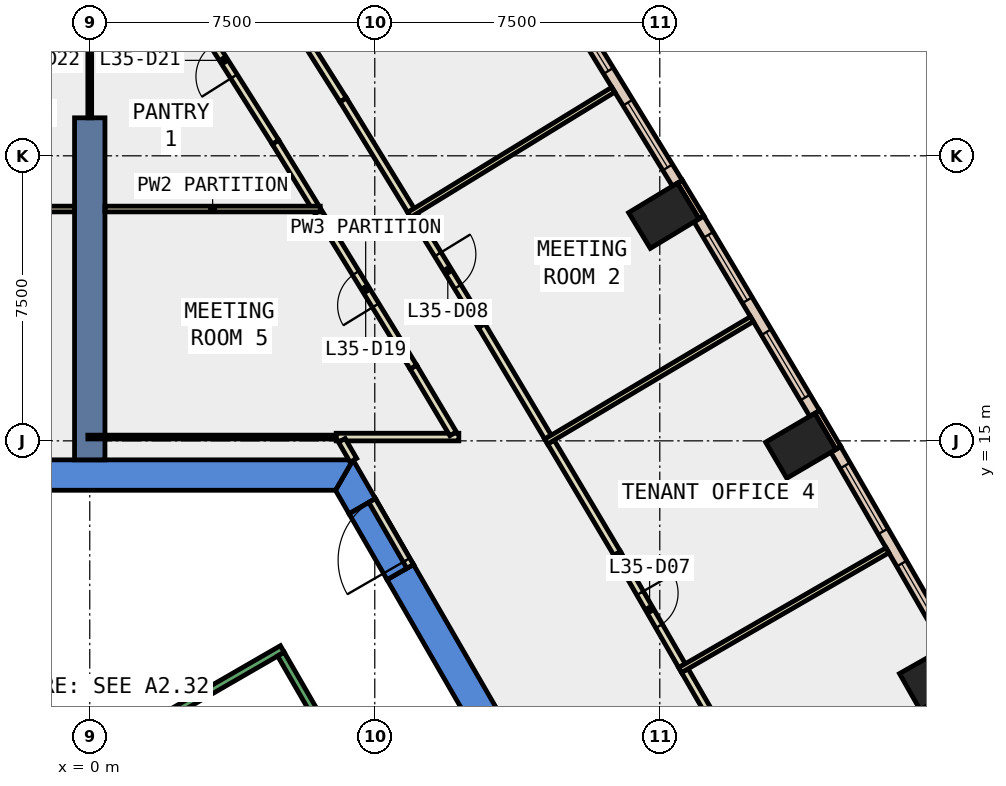
"""IFC4 building model, lengths in metres.
Left out: names, types, materials, properties, quantities, classifications, styles, units other than length and angle.
Written with IfcOpenShell. Run it as: python <this file> out.ifc"""

import sys

from ifc_helpers import new_model, si_unit, direction, frame, frame_2d, origin, origin_2d, place, context, subcontext, project, spatial, polyline, rectangle, outline, extrude, element, fill, save


model = new_model("IFC4")
c1 = context("Model", 3, precision=1e-05, world=origin(), true_north=direction((0.0, 1.0)))
c2 = subcontext(c1, "Body", "Model", "MODEL_VIEW")
j1 = project(units=[si_unit("LENGTHUNIT", "METRE"), si_unit("PLANEANGLEUNIT", "RADIAN")], contexts=[c1])
p1 = place(None, origin())
s1 = spatial("IfcSite", under=j1, at=p1, CompositionType="ELEMENT")
p2 = place(p1, origin())
s2 = spatial("IfcBuilding", under=s1, at=p2, CompositionType="ELEMENT")
p3 = place(p2, frame((0.0, 0.0, 159.2)))
s3 = spatial("IfcBuildingStorey", under=s2, at=p3, CompositionType="ELEMENT", Elevation=159.2)
for number, where, z_axis, x_axis in (
    (1, (22.232, 8.769, -0.4), (0.0, 0.0, 1.0), (-0.494, 0.869, 0.0)),
    (2, (18.71, 14.87, -0.4), (0.0, 0.0, 1.0), (-0.506, 0.863, 0.0)),
    (3, (15.107, 20.923, -0.4), (0.0, 0.0, 1.0), (-0.518, 0.855, 0.0)),
):
    element("IfcColumn", number, at=place(p3, frame(where, z_axis=z_axis, x_axis=x_axis)), inside=s3, PredefinedType="COLUMN", context=c2, shape_type="SweptSolid", body=[
        extrude(rectangle(XDim=1.1, YDim=1.5, at=origin_2d()), origin(), (0.0, 0.0, 1.0), 4.2),
    ])
p4 = place(p3, frame((0.0, 0.0, -0.4)))
e4 = element("IfcWall", 4, at=p4, inside=s3, PredefinedType="SHEAR", context=c2, shape_type="SweptSolid", body=[
    extrude(outline(polyline([(8.517, 11.748), (7.824, 11.348), (12.933, 2.5), (13.856, 2.5), (8.517, 11.748)])), origin(), (0.0, 0.0, 1.0), 4.2),
])
p5 = place(p3, frame((0.0, 0.0, -0.4)))
e5 = element("IfcWall", 5, at=p5, inside=s3, PredefinedType="SHEAR", context=c2, shape_type="SweptSolid", body=[
    extrude(outline(polyline([(6.824, 13.08), (7.517, 13.48), (6.928, 14.5), (6.466, 13.7), (6.824, 13.08)])), origin(), (0.0, 0.0, 1.0), 4.2),
])
p6 = place(p3, frame((0.0, 0.0, 3.6)))
e6 = element("IfcWall", 6, at=p6, inside=s3, PredefinedType="SHEAR", context=c2, shape_type="SweptSolid", body=[
    extrude(outline(polyline([(7.517, 13.48), (6.824, 13.08), (7.824, 11.348), (8.517, 11.748), (7.517, 13.48)])), origin(), (0.0, 0.0, 1.0), 0.2),
])
p7 = place(p3, frame((0.0, 0.0, -0.4)))
e7 = element("IfcWall", 7, at=p7, inside=s3, PredefinedType="SHEAR", context=c2, shape_type="SweptSolid", body=[
    extrude(outline(polyline([(6.928, 14.5), (-6.928, 14.5), (-6.466, 13.7), (6.466, 13.7), (6.928, 14.5)])), origin(), (0.0, 0.0, 1.0), 4.2),
])
p8 = place(p3, frame((0.0, 14.5, -0.4), z_axis=(0.0, 0.0, 1.0), x_axis=(0.0, 1.0, 0.0)))
e8 = element("IfcWall", 8, at=p8, inside=s3, PredefinedType="SHEAR", context=c2, shape_type="SweptSolid", body=[
    extrude(rectangle(XDim=9.0, YDim=0.8, at=frame_2d((4.5, 0.0))), origin(), (0.0, 0.0, 1.0), 4.2),
])
p9 = place(p3, frame((19.7, 14.813, 0.0), z_axis=(0.0, 0.0, 1.0), x_axis=(-0.506505715302, 0.862236603472, 0.0)))
e9 = element("IfcWall", 9, at=p9, inside=s3, PredefinedType="STANDARD", context=c2, shape_type="SweptSolid", body=[
    extrude(rectangle(XDim=1.099, YDim=0.15, at=frame_2d((0.55, 0.0))), origin(), (0.0, 0.0, 1.0), 3.8),
])
p10 = place(p3, frame((16.098, 20.88, 0.0), z_axis=(0.0, 0.0, 1.0), x_axis=(-0.517918067967, 0.85543022794, 0.0)))
e10 = element("IfcWall", 10, at=p10, inside=s3, PredefinedType="STANDARD", context=c2, shape_type="SweptSolid", body=[
    extrude(rectangle(XDim=1.1, YDim=0.15, at=frame_2d((0.55, 0.0))), origin(), (0.0, 0.0, 1.0), 3.8),
])
p11 = place(p3, frame((22.61, 9.615, 0.0), z_axis=(0.0, 0.0, 1.0), x_axis=(-0.500061823953, 0.865989706766, 0.0)))
e11 = element("IfcWall", 11, at=p11, inside=s3, PredefinedType="STANDARD", context=c2, shape_type="SweptSolid", body=[
    extrude(rectangle(XDim=5.957, YDim=0.3, at=frame_2d((2.979, 0.0))), origin(), (0.0, 0.0, 1.0), 3.8),
])
p12 = place(p11, frame((0.489, 0.0, 0.9)))
e12 = element("IfcOpeningElement", 12, at=p12, cuts=e11, PredefinedType="OPENING", context=c2, shape_type="SweptSolid", body=[
    extrude(rectangle(XDim=2.0, YDim=2.6, at=frame_2d((1.0, 1.3))), frame((0.0, 0.16, 0.0), z_axis=(0.0, -1.0, 0.0), x_axis=(1.0, 0.0, 0.0)), (0.0, 0.0, 1.0), 0.32),
])
p13 = place(p11, frame((3.468, 0.0, 0.9)))
e13 = element("IfcOpeningElement", 13, at=p13, cuts=e11, PredefinedType="OPENING", context=c2, shape_type="SweptSolid", body=[
    extrude(rectangle(XDim=2.0, YDim=2.6, at=frame_2d((1.0, 1.3))), frame((0.0, 0.16, 0.0), z_axis=(0.0, -1.0, 0.0), x_axis=(1.0, 0.0, 0.0)), (0.0, 0.0, 1.0), 0.32),
])
p14 = place(p3, frame((19.076, 15.721, 0.0), z_axis=(0.0, 0.0, 1.0), x_axis=(-0.511455040009, 0.859310038374, 0.0)))
e14 = element("IfcWall", 14, at=p14, inside=s3, PredefinedType="STANDARD", context=c2, shape_type="SweptSolid", body=[
    extrude(rectangle(XDim=5.957, YDim=0.3, at=frame_2d((2.979, 0.0))), origin(), (0.0, 0.0, 1.0), 3.8),
])
p15 = place(p14, frame((0.489, 0.0, 0.9)))
e15 = element("IfcOpeningElement", 15, at=p15, cuts=e14, PredefinedType="OPENING", context=c2, shape_type="SweptSolid", body=[
    extrude(rectangle(XDim=2.0, YDim=2.6, at=frame_2d((1.0, 1.3))), frame((0.0, 0.16, 0.0), z_axis=(0.0, -1.0, 0.0), x_axis=(1.0, 0.0, 0.0)), (0.0, 0.0, 1.0), 0.32),
])
p16 = place(p14, frame((3.468, 0.0, 0.9)))
e16 = element("IfcOpeningElement", 16, at=p16, cuts=e14, PredefinedType="OPENING", context=c2, shape_type="SweptSolid", body=[
    extrude(rectangle(XDim=2.0, YDim=2.6, at=frame_2d((1.0, 1.3))), frame((0.0, 0.16, 0.0), z_axis=(0.0, -1.0, 0.0), x_axis=(1.0, 0.0, 0.0)), (0.0, 0.0, 1.0), 0.32),
])
p17 = place(p3, frame((15.462, 21.779, 0.0), z_axis=(0.0, 0.0, 1.0), x_axis=(-0.522704272908, 0.852514072074, 0.0)))
e17 = element("IfcWall", 17, at=p17, inside=s3, PredefinedType="STANDARD", context=c2, shape_type="SweptSolid", body=[
    extrude(rectangle(XDim=5.958, YDim=0.3, at=frame_2d((2.979, 0.0))), origin(), (0.0, 0.0, 1.0), 3.8),
])
p18 = place(p17, frame((0.489, 0.0, 0.9)))
e18 = element("IfcOpeningElement", 18, at=p18, cuts=e17, PredefinedType="OPENING", context=c2, shape_type="SweptSolid", body=[
    extrude(rectangle(XDim=2.0, YDim=2.6, at=frame_2d((1.0, 1.3))), frame((0.0, 0.16, 0.0), z_axis=(0.0, -1.0, 0.0), x_axis=(1.0, 0.0, 0.0)), (0.0, 0.0, 1.0), 0.32),
])
p19 = place(p17, frame((3.468, 0.0, 0.9)))
e19 = element("IfcOpeningElement", 19, at=p19, cuts=e17, PredefinedType="OPENING", context=c2, shape_type="SweptSolid", body=[
    extrude(rectangle(XDim=2.0, YDim=2.6, at=frame_2d((1.0, 1.3))), frame((0.0, 0.16, 0.0), z_axis=(0.0, -1.0, 0.0), x_axis=(1.0, 0.0, 0.0)), (0.0, 0.0, 1.0), 0.32),
])
p20 = place(p3, frame((6.484, 15.1, 0.0), z_axis=(0.0, 0.0, 1.0), x_axis=(1.0, 0.0, 0.0)))
e20 = element("IfcWall", 20, at=p20, inside=s3, PredefinedType="PARTITIONING", context=c2, shape_type="SweptSolid", body=[
    extrude(rectangle(XDim=3.228, YDim=0.2, at=frame_2d((1.614, 0.0))), origin(), (0.0, 0.0, 1.0), 3.8),
])
p21 = place(p3, frame((9.561, 15.186, 0.0), z_axis=(0.0, 0.0, 1.0), x_axis=(-0.511399832047, 0.859342895346, 0.0)))
e21 = element("IfcWall", 21, at=p21, inside=s3, PredefinedType="PARTITIONING", context=c2, shape_type="SweptSolid", body=[
    extrude(rectangle(XDim=2.043, YDim=0.2, at=frame_2d((1.021, 0.0))), origin(), (0.0, 0.0, 1.0), 3.8),
])
p22 = place(p3, frame((8.516, 16.942, 0.0), z_axis=(0.0, 0.0, 1.0), x_axis=(-0.522865983217, 0.852414901086, 0.0)))
e22 = element("IfcWall", 22, at=p22, inside=s3, PredefinedType="PARTITIONING", context=c2, shape_type="SweptSolid", body=[
    extrude(rectangle(XDim=4.803, YDim=0.2, at=frame_2d((2.401, 0.0))), origin(), (0.0, 0.0, 1.0), 3.8),
])
p23 = place(p22, frame((1.901, 0.0, 0.0)))
e23 = element("IfcOpeningElement", 23, at=p23, cuts=e22, PredefinedType="OPENING", context=c2, shape_type="SweptSolid", body=[
    extrude(rectangle(XDim=1.0, YDim=2.1, at=frame_2d((0.5, 1.05))), frame((0.0, 0.11, 0.0), z_axis=(0.0, -1.0, 0.0), x_axis=(1.0, 0.0, 0.0)), (0.0, 0.0, 1.0), 0.22),
])
p24 = place(p3, frame((6.937, 14.488, 0.0), z_axis=(0.0, 0.0, 1.0), x_axis=(-0.499908430952, 0.866078264744, 0.0)))
e24 = element("IfcWall", 24, at=p24, inside=s3, PredefinedType="PARTITIONING", context=c2, shape_type="SweptSolid", body=[
    extrude(rectangle(XDim=0.606, YDim=0.2, at=frame_2d((0.303, 0.0))), origin(), (0.0, 0.0, 1.0), 3.8),
])
p25 = place(p3, frame((5.927, 21.164, 0.0), z_axis=(0.0, 0.0, 1.0), x_axis=(-0.522754838565, 0.852483066552, 0.0)))
e25 = element("IfcWall", 25, at=p25, inside=s3, PredefinedType="PARTITIONING", context=c2, shape_type="SweptSolid", body=[
    extrude(rectangle(XDim=1.99, YDim=0.2, at=frame_2d((0.995, 0.0))), origin(), (0.0, 0.0, 1.0), 3.8),
])
p26 = place(p3, frame((4.887, 22.86, 0.0), z_axis=(0.0, 0.0, 1.0), x_axis=(-0.534315942524, 0.845284847589, 0.0)))
e26 = element("IfcWall", 26, at=p26, inside=s3, PredefinedType="PARTITIONING", context=c2, shape_type="SweptSolid", body=[
    extrude(rectangle(XDim=5.091, YDim=0.2, at=frame_2d((2.545, 0.0))), origin(), (0.0, 0.0, 1.0), 3.8),
])
p27 = place(p26, frame((2.045, 0.0, 0.0)))
e27 = element("IfcOpeningElement", 27, at=p27, cuts=e26, PredefinedType="OPENING", context=c2, shape_type="SweptSolid", body=[
    extrude(rectangle(XDim=1.0, YDim=2.1, at=frame_2d((0.5, 1.05))), frame((0.0, 0.11, 0.0), z_axis=(0.0, -1.0, 0.0), x_axis=(1.0, 0.0, 0.0)), (0.0, 0.0, 1.0), 0.22),
])
p28 = place(p3, frame((15.659, 8.954, 0.0), z_axis=(0.0, 0.0, 1.0), x_axis=(0.50001992892, -0.866013897511, 0.0)))
e28 = element("IfcWall", 28, at=p28, inside=s3, PredefinedType="PARTITIONING", context=c2, shape_type="SweptSolid", body=[
    extrude(rectangle(XDim=3.41, YDim=0.2, at=frame_2d((1.705, 0.0))), origin(), (0.0, 0.0, 1.0), 3.8),
])
p29 = place(p3, frame((12.134, 14.968, 0.0), z_axis=(0.0, 0.0, 1.0), x_axis=(0.511545516492, -0.859256180983, 0.0)))
e29 = element("IfcWall", 29, at=p29, inside=s3, PredefinedType="PARTITIONING", context=c2, shape_type="SweptSolid", body=[
    extrude(rectangle(XDim=3.411, YDim=0.2, at=frame_2d((1.706, 0.0))), origin(), (0.0, 0.0, 1.0), 3.8),
])
p30 = place(p3, frame((13.879, 12.037, 0.0), z_axis=(0.0, 0.0, 1.0), x_axis=(0.50001992892, -0.866013897511, 0.0)))
e30 = element("IfcWall", 30, at=p30, inside=s3, PredefinedType="PARTITIONING", context=c2, shape_type="SweptSolid", body=[
    extrude(rectangle(XDim=3.41, YDim=0.2, at=frame_2d((1.705, 0.0))), origin(), (0.0, 0.0, 1.0), 3.8),
])
p31 = place(p30, frame((1.205, 0.0, 0.0)))
e31 = element("IfcOpeningElement", 31, at=p31, cuts=e30, PredefinedType="OPENING", context=c2, shape_type="SweptSolid", body=[
    extrude(rectangle(XDim=1.0, YDim=2.1, at=frame_2d((0.5, 1.05))), frame((0.0, 0.11, 0.0), z_axis=(0.0, -1.0, 0.0), x_axis=(1.0, 0.0, 0.0)), (0.0, 0.0, 1.0), 0.22),
])
p32 = place(p3, frame((8.53, 20.935, 0.0), z_axis=(0.0, 0.0, 1.0), x_axis=(0.522830634433, -0.852436582801, 0.0)))
e32 = element("IfcWall", 32, at=p32, inside=s3, PredefinedType="PARTITIONING", context=c2, shape_type="SweptSolid", body=[
    extrude(rectangle(XDim=3.41, YDim=0.2, at=frame_2d((1.705, 0.0))), origin(), (0.0, 0.0, 1.0), 3.8),
])
p33 = place(p32, frame((1.205, 0.0, 0.0)))
e33 = element("IfcOpeningElement", 33, at=p33, cuts=e32, PredefinedType="OPENING", context=c2, shape_type="SweptSolid", body=[
    extrude(rectangle(XDim=1.0, YDim=2.1, at=frame_2d((0.5, 1.05))), frame((0.0, 0.11, 0.0), z_axis=(0.0, -1.0, 0.0), x_axis=(1.0, 0.0, 0.0)), (0.0, 0.0, 1.0), 0.22),
])
p34 = place(p3, frame((10.313, 18.028, 0.0), z_axis=(0.0, 0.0, 1.0), x_axis=(0.511566898838, -0.859243450958, 0.0)))
e34 = element("IfcWall", 34, at=p34, inside=s3, PredefinedType="PARTITIONING", context=c2, shape_type="SweptSolid", body=[
    extrude(rectangle(XDim=3.411, YDim=0.2, at=frame_2d((1.706, 0.0))), origin(), (0.0, 0.0, 1.0), 3.8),
])
p35 = place(p3, frame((3.209, 29.446, 0.0), z_axis=(0.0, 0.0, 1.0), x_axis=(0.534253865926, -0.845324083854, 0.0)))
e35 = element("IfcWall", 35, at=p35, inside=s3, PredefinedType="PARTITIONING", context=c2, shape_type="SweptSolid", body=[
    extrude(rectangle(XDim=6.478, YDim=0.2, at=frame_2d((3.239, 0.0))), origin(), (0.0, 0.0, 1.0), 3.8),
])
p36 = place(p35, frame((2.739, 0.0, 0.0)))
e36 = element("IfcOpeningElement", 36, at=p36, cuts=e35, PredefinedType="OPENING", context=c2, shape_type="SweptSolid", body=[
    extrude(rectangle(XDim=1.0, YDim=2.1, at=frame_2d((0.5, 1.05))), frame((0.0, 0.11, 0.0), z_axis=(0.0, -1.0, 0.0), x_axis=(1.0, 0.0, 0.0)), (0.0, 0.0, 1.0), 0.22),
])
p37 = place(p3, frame((6.67, 23.97, 0.0), z_axis=(0.0, 0.0, 1.0), x_axis=(0.522622501212, -0.85256420358, 0.0)))
e37 = element("IfcWall", 37, at=p37, inside=s3, PredefinedType="PARTITIONING", context=c2, shape_type="SweptSolid", body=[
    extrude(rectangle(XDim=3.41, YDim=0.2, at=frame_2d((1.705, 0.0))), origin(), (0.0, 0.0, 1.0), 3.8),
])
p38 = place(p3, frame((6.484, 15.1, 0.0), z_axis=(0.0, 0.0, 1.0), x_axis=(-1.0, 0.0, 0.0)))
e38 = element("IfcWall", 38, at=p38, inside=s3, PredefinedType="PARTITIONING", context=c2, shape_type="SweptSolid", body=[
    extrude(rectangle(XDim=6.534, YDim=0.1, at=frame_2d((3.267, 0.0))), origin(), (0.0, 0.0, 1.0), 3.8),
])
for number, where, z_axis, x_axis in (
    (39, (0.4, 21.1, 0.0), (0.0, 0.0, 1.0), (1.0, 0.0, 0.0)),
    (40, (-6.066, 21.1, 0.0), (0.0, 0.0, 1.0), (1.0, 0.0, 0.0)),
):
    element("IfcWall", number, at=place(p3, frame(where, z_axis=z_axis, x_axis=x_axis)), inside=s3, PredefinedType="PARTITIONING", context=c2, shape_type="SweptSolid", body=[
        extrude(rectangle(XDim=5.666, YDim=0.15, at=frame_2d((2.833, 0.0))), origin(), (0.0, 0.0, 1.0), 3.8),
    ])
p39 = place(p3, frame((0.0, 23.5, 0.0), z_axis=(0.0, 0.0, 1.0), x_axis=(0.0, 1.0, 0.0)))
e41 = element("IfcWall", 41, at=p39, inside=s3, PredefinedType="PARTITIONING", context=c2, shape_type="SweptSolid", body=[
    extrude(rectangle(XDim=3.675, YDim=0.1, at=frame_2d((1.837, 0.0))), origin(), (0.0, 0.0, 1.0), 3.8),
])
p40 = place(p3, frame((15.535, 8.969, 0.0), z_axis=(0.0, 0.0, 1.0), x_axis=(0.865951968193, 0.500127172609, 0.0)))
e42 = element("IfcWall", 42, at=p40, inside=s3, PredefinedType="PARTITIONING", context=c2, shape_type="SweptSolid", body=[
    extrude(rectangle(XDim=6.301, YDim=0.15, at=frame_2d((3.15, 0.0))), origin(), (0.0, 0.0, 1.0), 3.8),
])
for number, where, z_axis, x_axis in (
    (43, (12.01, 14.981, 0.0), (0.0, 0.0, 1.0), (0.859, 0.511, 0.0)),
    (44, (8.406, 20.947, 0.0), (0.0, 0.0, 1.0), (0.853, 0.523, 0.0)),
):
    element("IfcWall", number, at=place(p3, frame(where, z_axis=z_axis, x_axis=x_axis)), inside=s3, PredefinedType="PARTITIONING", context=c2, shape_type="SweptSolid", body=[
        extrude(rectangle(XDim=6.3, YDim=0.15, at=frame_2d((3.15, 0.0))), origin(), (0.0, 0.0, 1.0), 3.8),
    ])
p41 = place(p3, frame((8.43, 11.698, 0.0), z_axis=(0.0, 0.0, 1.0), x_axis=(-0.50002537861, 0.866010750942, 0.0)))
e45 = element("IfcWall", 45, at=p41, inside=s3, PredefinedType="PARTITIONING", context=c2, shape_type="SweptSolid", body=[
    extrude(rectangle(XDim=2.0, YDim=0.2, at=frame_2d((1.0, 0.0))), origin(), (0.0, 0.0, 1.0), 2.4),
])
p42 = place(p41, frame((0.19, 0.0, 0.0)))
e46 = element("IfcOpeningElement", 46, at=p42, cuts=e45, PredefinedType="OPENING", context=c2, shape_type="SweptSolid", body=[
    extrude(rectangle(XDim=1.8, YDim=2.1, at=frame_2d((0.9, 1.05))), frame((0.0, 0.11, 0.0), z_axis=(0.0, -1.0, 0.0), x_axis=(1.0, 0.0, 0.0)), (0.0, 0.0, 1.0), 0.22),
])
p43 = place(p3, frame((1.256, 7.324, 0.0), z_axis=(0.0, 0.0, 1.0), x_axis=(0.866046073146, 0.499964197906, 0.0)))
e47 = element("IfcWall", 47, at=p43, inside=s3, PredefinedType="STANDARD", context=c2, shape_type="SweptSolid", body=[
    extrude(rectangle(XDim=4.4, YDim=0.2, at=frame_2d((2.2, 0.0))), origin(), (0.0, 0.0, 1.0), 3.8),
])
p44 = place(p3, frame((8.48, 3.412, 0.0), z_axis=(0.0, 0.0, 1.0), x_axis=(-0.499978703459, 0.866037698999, 0.0)))
e48 = element("IfcWall", 48, at=p44, inside=s3, PredefinedType="STANDARD", context=c2, shape_type="SweptSolid", body=[
    extrude(rectangle(XDim=6.9, YDim=0.2, at=frame_2d((3.45, 0.0))), origin(), (0.0, 0.0, 1.0), 3.8),
])
p45 = place(p12, origin())
e49 = element("IfcWindow", 49, at=p45, inside=s3, PartitioningType="SINGLE_PANEL", PredefinedType="WINDOW", context=c2, shape_type="SweptSolid", body=[
    extrude(rectangle(XDim=2.0, YDim=2.6, at=frame_2d((1.0, 1.3))), frame((0.0, 0.03, 0.0), z_axis=(0.0, -1.0, 0.0), x_axis=(1.0, 0.0, 0.0)), (0.0, 0.0, 1.0), 0.06),
])
fill(e12, e49)
p46 = place(p13, origin())
e50 = element("IfcWindow", 50, at=p46, inside=s3, PartitioningType="SINGLE_PANEL", PredefinedType="WINDOW", context=c2, shape_type="SweptSolid", body=[
    extrude(rectangle(XDim=2.0, YDim=2.6, at=frame_2d((1.0, 1.3))), frame((0.0, 0.03, 0.0), z_axis=(0.0, -1.0, 0.0), x_axis=(1.0, 0.0, 0.0)), (0.0, 0.0, 1.0), 0.06),
])
fill(e13, e50)
p47 = place(p15, origin())
e51 = element("IfcWindow", 51, at=p47, inside=s3, PartitioningType="SINGLE_PANEL", PredefinedType="WINDOW", context=c2, shape_type="SweptSolid", body=[
    extrude(rectangle(XDim=2.0, YDim=2.6, at=frame_2d((1.0, 1.3))), frame((0.0, 0.03, 0.0), z_axis=(0.0, -1.0, 0.0), x_axis=(1.0, 0.0, 0.0)), (0.0, 0.0, 1.0), 0.06),
])
fill(e15, e51)
p48 = place(p16, origin())
e52 = element("IfcWindow", 52, at=p48, inside=s3, PartitioningType="SINGLE_PANEL", PredefinedType="WINDOW", context=c2, shape_type="SweptSolid", body=[
    extrude(rectangle(XDim=2.0, YDim=2.6, at=frame_2d((1.0, 1.3))), frame((0.0, 0.03, 0.0), z_axis=(0.0, -1.0, 0.0), x_axis=(1.0, 0.0, 0.0)), (0.0, 0.0, 1.0), 0.06),
])
fill(e16, e52)
p49 = place(p18, origin())
e53 = element("IfcWindow", 53, at=p49, inside=s3, PartitioningType="SINGLE_PANEL", PredefinedType="WINDOW", context=c2, shape_type="SweptSolid", body=[
    extrude(rectangle(XDim=2.0, YDim=2.6, at=frame_2d((1.0, 1.3))), frame((0.0, 0.03, 0.0), z_axis=(0.0, -1.0, 0.0), x_axis=(1.0, 0.0, 0.0)), (0.0, 0.0, 1.0), 0.06),
])
fill(e18, e53)
p50 = place(p19, origin())
e54 = element("IfcWindow", 54, at=p50, inside=s3, PartitioningType="SINGLE_PANEL", PredefinedType="WINDOW", context=c2, shape_type="SweptSolid", body=[
    extrude(rectangle(XDim=2.0, YDim=2.6, at=frame_2d((1.0, 1.3))), frame((0.0, 0.03, 0.0), z_axis=(0.0, -1.0, 0.0), x_axis=(1.0, 0.0, 0.0)), (0.0, 0.0, 1.0), 0.06),
])
fill(e19, e54)
p51 = place(p31, origin())
e55 = element("IfcDoor", 55, at=p51, inside=s3, OperationType="SINGLE_SWING_LEFT", PredefinedType="DOOR", context=c2, shape_type="SweptSolid", body=[
    extrude(rectangle(XDim=1.0, YDim=2.1, at=frame_2d((0.5, 1.05))), frame((0.0, 0.025, 0.0), z_axis=(0.0, -1.0, 0.0), x_axis=(1.0, 0.0, 0.0)), (0.0, 0.0, 1.0), 0.05),
])
fill(e31, e55)
p52 = place(p33, origin())
e56 = element("IfcDoor", 56, at=p52, inside=s3, OperationType="SINGLE_SWING_LEFT", PredefinedType="DOOR", context=c2, shape_type="SweptSolid", body=[
    extrude(rectangle(XDim=1.0, YDim=2.1, at=frame_2d((0.5, 1.05))), frame((0.0, 0.025, 0.0), z_axis=(0.0, -1.0, 0.0), x_axis=(1.0, 0.0, 0.0)), (0.0, 0.0, 1.0), 0.05),
])
fill(e33, e56)
p53 = place(p23, origin())
e57 = element("IfcDoor", 57, at=p53, inside=s3, OperationType="SINGLE_SWING_LEFT", PredefinedType="DOOR", context=c2, shape_type="SweptSolid", body=[
    extrude(rectangle(XDim=1.0, YDim=2.1, at=frame_2d((0.5, 1.05))), frame((0.0, 0.025, 0.0), z_axis=(0.0, -1.0, 0.0), x_axis=(1.0, 0.0, 0.0)), (0.0, 0.0, 1.0), 0.05),
])
fill(e23, e57)
p54 = place(p27, origin())
e58 = element("IfcDoor", 58, at=p54, inside=s3, OperationType="SINGLE_SWING_LEFT", PredefinedType="DOOR", context=c2, shape_type="SweptSolid", body=[
    extrude(rectangle(XDim=1.0, YDim=2.1, at=frame_2d((0.5, 1.05))), frame((0.0, 0.025, 0.0), z_axis=(0.0, -1.0, 0.0), x_axis=(1.0, 0.0, 0.0)), (0.0, 0.0, 1.0), 0.05),
])
fill(e27, e58)
p55 = place(p42, origin())
e59 = element("IfcDoor", 59, at=p55, inside=s3, OperationType="DOUBLE_DOOR_SINGLE_SWING", PredefinedType="DOOR", context=c2, shape_type="SweptSolid", body=[
    extrude(rectangle(XDim=1.8, YDim=2.1, at=frame_2d((0.9, 1.05))), frame((0.0, 0.025, 0.0), z_axis=(0.0, -1.0, 0.0), x_axis=(1.0, 0.0, 0.0)), (0.0, 0.0, 1.0), 0.05),
])
fill(e46, e59)
save(model, sys.argv[1])
